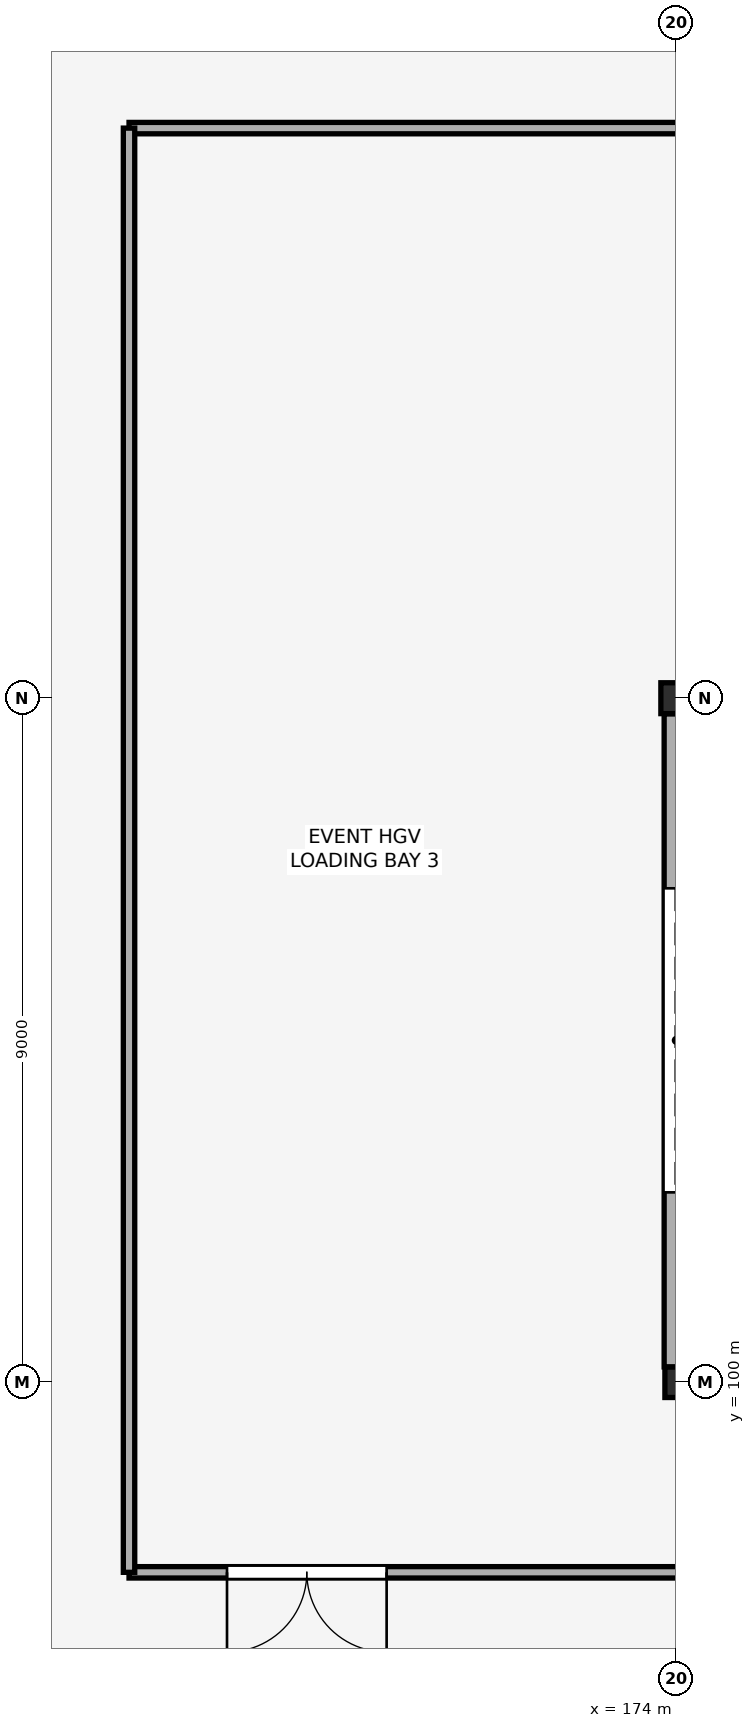
"""IFC4 building model, lengths in metres.
Left out: names, types, materials, properties, quantities, classifications, styles, units other than length and angle.
Written with IfcOpenShell. Run it as: python <this file> out.ifc"""

import sys

from ifc_helpers import new_model, si_unit, direction, frame, frame_2d, origin, origin_2d, place, context, subcontext, project, spatial, rectangle, hollow_circle, i_section, extrude, element, fill, save


model = new_model("IFC4")
c1 = context("Model", 3, precision=1e-05, world=origin(), true_north=direction((0.0, 1.0)))
c2 = subcontext(c1, "Body", "Model", "MODEL_VIEW")
j1 = project(units=[si_unit("LENGTHUNIT", "METRE"), si_unit("PLANEANGLEUNIT", "RADIAN")], contexts=[c1])
p1 = place(None, origin())
s1 = spatial("IfcSite", under=j1, at=p1, CompositionType="ELEMENT")
p2 = place(p1, origin())
s2 = spatial("IfcBuilding", under=s1, at=p2, CompositionType="ELEMENT")
p3 = place(p2, origin())
s3 = spatial("IfcBuildingStorey", under=s2, at=p3, CompositionType="ELEMENT", Elevation=0.0)
p4 = place(p3, frame((174.0, 100.0, 0.0), z_axis=(0.0, 0.0, 1.0), x_axis=(1.0, 0.0, 0.0)))
e1 = element("IfcColumn", 1, at=p4, inside=s3, PredefinedType="COLUMN", context=c2, shape_type="SweptSolid", body=[
    extrude(i_section(OverallWidth=0.3, OverallDepth=0.4, WebThickness=0.013, FlangeThickness=0.024, FilletRadius=0.027, at=origin_2d()), origin(), (0.0, 0.0, 1.0), 5.4),
])
p5 = place(p3, frame((174.0, 109.0, 0.0), z_axis=(0.0, 0.0, 1.0), x_axis=(1.0, 0.0, 0.0)))
e2 = element("IfcColumn", 2, at=p5, inside=s3, PredefinedType="COLUMN", context=c2, shape_type="SweptSolid", body=[
    extrude(hollow_circle(Radius=0.203, WallThickness=0.016, at=origin_2d()), origin(), (0.0, 0.0, 1.0), 5.4),
])
p6 = place(p3, frame((174.0, 108.795, 0.0), z_axis=(0.0, 0.0, 1.0), x_axis=(0.0, -1.0, 0.0)))
e3 = element("IfcWall", 3, at=p6, inside=s3, PredefinedType="STANDARD", context=c2, shape_type="SweptSolid", body=[
    extrude(rectangle(XDim=8.593, YDim=0.32, at=frame_2d((4.296, 0.0))), origin(), (0.0, 0.0, 1.0), 4.815),
])
p7 = place(p6, frame((2.296, 0.0, 0.0)))
e4 = element("IfcOpeningElement", 4, at=p7, cuts=e3, PredefinedType="OPENING", context=c2, shape_type="SweptSolid", body=[
    extrude(rectangle(XDim=4.0, YDim=4.1, at=frame_2d((2.0, 2.05))), frame((0.0, 0.17, 0.0), z_axis=(0.0, -1.0, 0.0), x_axis=(1.0, 0.0, 0.0)), (0.0, 0.0, 1.0), 0.34),
])
p8 = place(p3, frame((166.8, 116.5, 0.0), z_axis=(0.0, 0.0, 1.0), x_axis=(1.0, 0.0, 0.0)))
e5 = element("IfcWall", 5, at=p8, inside=s3, PredefinedType="PARTITIONING", context=c2, shape_type="SweptSolid", body=[
    extrude(rectangle(XDim=7.325, YDim=0.15, at=frame_2d((3.663, 0.0))), origin(), (0.0, 0.0, 1.0), 5.12),
])
p9 = place(p3, frame((174.125, 97.5, 0.0), z_axis=(0.0, 0.0, 1.0), x_axis=(-1.0, 0.0, 0.0)))
e6 = element("IfcWall", 6, at=p9, inside=s3, PredefinedType="PARTITIONING", context=c2, shape_type="SweptSolid", body=[
    extrude(rectangle(XDim=7.325, YDim=0.15, at=frame_2d((3.663, 0.0))), origin(), (0.0, 0.0, 1.0), 5.12),
])
p10 = place(p9, frame((3.936, 0.0, 0.0)))
e7 = element("IfcOpeningElement", 7, at=p10, cuts=e6, PredefinedType="OPENING", context=c2, shape_type="SweptSolid", body=[
    extrude(rectangle(XDim=2.1, YDim=2.4, at=frame_2d((1.05, 1.2))), frame((0.0, 0.085, 0.0), z_axis=(0.0, -1.0, 0.0), x_axis=(1.0, 0.0, 0.0)), (0.0, 0.0, 1.0), 0.17),
])
p11 = place(p3, frame((166.8, 97.5, 0.0), z_axis=(0.0, 0.0, 1.0), x_axis=(0.0, 1.0, 0.0)))
e8 = element("IfcWall", 8, at=p11, inside=s3, PredefinedType="PARTITIONING", context=c2, shape_type="SweptSolid", body=[
    extrude(rectangle(XDim=19.0, YDim=0.15, at=frame_2d((9.5, 0.0))), origin(), (0.0, 0.0, 1.0), 5.12),
])
p12 = place(p7, origin())
e9 = element("IfcDoor", 9, at=p12, inside=s3, OperationType="ROLLINGUP", PredefinedType="GATE", context=c2, shape_type="SweptSolid", body=[
    extrude(rectangle(XDim=4.0, YDim=4.1, at=frame_2d((2.0, 2.05))), frame((0.0, 0.025, 0.0), z_axis=(0.0, -1.0, 0.0), x_axis=(1.0, 0.0, 0.0)), (0.0, 0.0, 1.0), 0.05),
])
fill(e4, e9)
p13 = place(p10, origin())
e10 = element("IfcDoor", 10, at=p13, inside=s3, OperationType="DOUBLE_DOOR_SINGLE_SWING", PredefinedType="DOOR", context=c2, shape_type="SweptSolid", body=[
    extrude(rectangle(XDim=2.1, YDim=2.4, at=frame_2d((1.05, 1.2))), frame((0.0, 0.025, 0.0), z_axis=(0.0, -1.0, 0.0), x_axis=(1.0, 0.0, 0.0)), (0.0, 0.0, 1.0), 0.05),
])
fill(e7, e10)
save(model, sys.argv[1])
